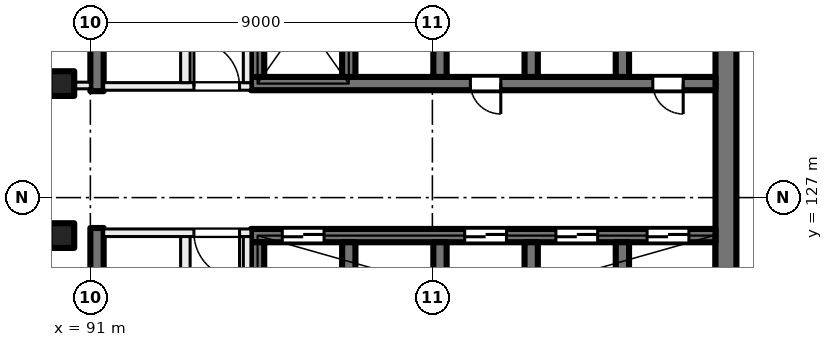
"""IFC4 building model, lengths in metres.
Left out: names, types, materials, properties, quantities, classifications, styles, units other than length and angle.
Written with IfcOpenShell. Run it as: python <this file> out.ifc"""

import sys

from ifc_helpers import new_model, si_unit, direction, frame, frame_2d, origin, origin_2d, place, context, subcontext, project, spatial, rectangle, extrude, element, fill, save


model = new_model("IFC4")
c1 = context("Model", 3, precision=1e-05, world=origin(), true_north=direction((0.0, 1.0)))
c2 = subcontext(c1, "Body", "Model", "MODEL_VIEW")
j1 = project(units=[si_unit("LENGTHUNIT", "METRE"), si_unit("PLANEANGLEUNIT", "RADIAN")], contexts=[c1])
p1 = place(None, origin())
s1 = spatial("IfcSite", under=j1, at=p1, CompositionType="ELEMENT")
p2 = place(p1, origin())
s2 = spatial("IfcBuilding", under=s1, at=p2, CompositionType="ELEMENT")
p3 = place(p2, frame((0.0, 0.0, 142.5)))
s3 = spatial("IfcBuildingStorey", under=s2, at=p3, CompositionType="ELEMENT", Elevation=142.5)
for number, where, z_axis, x_axis in (
    (1, (90.25, 130.0, 0.0), (0.0, 0.0, 1.0), (1.0, 0.0, 0.0)),
    (2, (90.25, 126.0, 0.0), (0.0, 0.0, 1.0), (1.0, 0.0, 0.0)),
):
    element("IfcColumn", number, at=place(p3, frame(where, z_axis=z_axis, x_axis=x_axis)), inside=s3, PredefinedType="COLUMN", context=c2, shape_type="SweptSolid", body=[
        extrude(rectangle(XDim=0.65, YDim=0.65, at=origin_2d()), origin(), (0.0, 0.0, 1.0), 4.0),
    ])
p4 = place(p3, frame((107.725, 135.2, 0.0), z_axis=(0.0, 0.0, 1.0), x_axis=(0.0, -1.0, 0.0)))
e3 = element("IfcWall", 3, at=p4, inside=s3, PredefinedType="SHEAR", context=c2, shape_type="SweptSolid", body=[
    extrude(rectangle(XDim=14.4, YDim=0.55, at=frame_2d((7.2, 0.0))), origin(), (0.0, 0.0, 1.0), 4.0),
])
p5 = place(p3, frame((107.45, 130.0, 0.0), z_axis=(0.0, 0.0, 1.0), x_axis=(-1.0, 0.0, 0.0)))
e4 = element("IfcWall", 4, at=p5, inside=s3, PredefinedType="SHEAR", context=c2, shape_type="SweptSolid", body=[
    extrude(rectangle(XDim=12.225, YDim=0.35, at=frame_2d((6.112, 0.0))), origin(), (0.0, 0.0, 1.0), 4.0),
])
p6 = place(p5, frame((0.85, 0.0, 0.0)))
e5 = element("IfcOpeningElement", 5, at=p6, cuts=e4, PredefinedType="OPENING", context=c2, shape_type="SweptSolid", body=[
    extrude(rectangle(XDim=0.8, YDim=2.1, at=frame_2d((0.4, 1.05))), frame((0.0, 0.185, 0.0), z_axis=(0.0, -1.0, 0.0), x_axis=(1.0, 0.0, 0.0)), (0.0, 0.0, 1.0), 0.37),
])
p7 = place(p5, frame((5.65, 0.0, 0.0)))
e6 = element("IfcOpeningElement", 6, at=p7, cuts=e4, PredefinedType="OPENING", context=c2, shape_type="SweptSolid", body=[
    extrude(rectangle(XDim=0.8, YDim=2.1, at=frame_2d((0.4, 1.05))), frame((0.0, 0.185, 0.0), z_axis=(0.0, -1.0, 0.0), x_axis=(1.0, 0.0, 0.0)), (0.0, 0.0, 1.0), 0.37),
])
for number, where, z_axis, x_axis in (
    (7, (105.0, 133.225, 0.0), (0.0, 0.0, 1.0), (0.0, -1.0, 0.0)),
    (8, (102.6, 133.225, 0.0), (0.0, 0.0, 1.0), (0.0, -1.0, 0.0)),
    (9, (100.2, 133.225, 0.0), (0.0, 0.0, 1.0), (0.0, -1.0, 0.0)),
    (10, (97.8, 133.225, 0.0), (0.0, 0.0, 1.0), (0.0, -1.0, 0.0)),
    (11, (95.4, 133.225, 0.0), (0.0, 0.0, 1.0), (0.0, -1.0, 0.0)),
):
    element("IfcWall", number, at=place(p3, frame(where, z_axis=z_axis, x_axis=x_axis)), inside=s3, PredefinedType="SHEAR", context=c2, shape_type="SweptSolid", body=[
        extrude(rectangle(XDim=3.05, YDim=0.35, at=frame_2d((1.525, 0.0))), origin(), (0.0, 0.0, 1.0), 4.0),
    ])
p8 = place(p3, frame((107.45, 126.0, 0.0), z_axis=(0.0, 0.0, 1.0), x_axis=(-1.0, 0.0, 0.0)))
e12 = element("IfcWall", 12, at=p8, inside=s3, PredefinedType="SHEAR", context=c2, shape_type="SweptSolid", body=[
    extrude(rectangle(XDim=12.225, YDim=0.35, at=frame_2d((6.112, 0.0))), origin(), (0.0, 0.0, 1.0), 4.0),
])
p9 = place(p8, frame((0.7, 0.0, 0.0)))
e13 = element("IfcOpeningElement", 13, at=p9, cuts=e12, PredefinedType="OPENING", context=c2, shape_type="SweptSolid", body=[
    extrude(rectangle(XDim=1.1, YDim=2.1, at=frame_2d((0.55, 1.05))), frame((0.0, 0.185, 0.0), z_axis=(0.0, -1.0, 0.0), x_axis=(1.0, 0.0, 0.0)), (0.0, 0.0, 1.0), 0.37),
])
p10 = place(p8, frame((3.1, 0.0, 0.0)))
e14 = element("IfcOpeningElement", 14, at=p10, cuts=e12, PredefinedType="OPENING", context=c2, shape_type="SweptSolid", body=[
    extrude(rectangle(XDim=1.1, YDim=2.1, at=frame_2d((0.55, 1.05))), frame((0.0, 0.185, 0.0), z_axis=(0.0, -1.0, 0.0), x_axis=(1.0, 0.0, 0.0)), (0.0, 0.0, 1.0), 0.37),
])
p11 = place(p8, frame((5.5, 0.0, 0.0)))
e15 = element("IfcOpeningElement", 15, at=p11, cuts=e12, PredefinedType="OPENING", context=c2, shape_type="SweptSolid", body=[
    extrude(rectangle(XDim=1.1, YDim=2.1, at=frame_2d((0.55, 1.05))), frame((0.0, 0.185, 0.0), z_axis=(0.0, -1.0, 0.0), x_axis=(1.0, 0.0, 0.0)), (0.0, 0.0, 1.0), 0.37),
])
p12 = place(p8, frame((10.3, 0.0, 0.0)))
e16 = element("IfcOpeningElement", 16, at=p12, cuts=e12, PredefinedType="OPENING", context=c2, shape_type="SweptSolid", body=[
    extrude(rectangle(XDim=1.1, YDim=2.1, at=frame_2d((0.55, 1.05))), frame((0.0, 0.185, 0.0), z_axis=(0.0, -1.0, 0.0), x_axis=(1.0, 0.0, 0.0)), (0.0, 0.0, 1.0), 0.37),
])
for number, where, z_axis, x_axis in (
    (17, (105.0, 125.825, 0.0), (0.0, 0.0, 1.0), (0.0, -1.0, 0.0)),
    (18, (102.6, 125.825, 0.0), (0.0, 0.0, 1.0), (0.0, -1.0, 0.0)),
    (19, (100.2, 125.825, 0.0), (0.0, 0.0, 1.0), (0.0, -1.0, 0.0)),
    (20, (97.8, 125.825, 0.0), (0.0, 0.0, 1.0), (0.0, -1.0, 0.0)),
    (21, (95.4, 125.825, 0.0), (0.0, 0.0, 1.0), (0.0, -1.0, 0.0)),
):
    element("IfcWall", number, at=place(p3, frame(where, z_axis=z_axis, x_axis=x_axis)), inside=s3, PredefinedType="SHEAR", context=c2, shape_type="SweptSolid", body=[
        extrude(rectangle(XDim=3.05, YDim=0.35, at=frame_2d((1.525, 0.0))), origin(), (0.0, 0.0, 1.0), 4.0),
    ])
for number, where, z_axis, x_axis in (
    (22, (91.175, 138.45, 0.0), (0.0, 0.0, 1.0), (0.0, -1.0, 0.0)),
    (23, (91.175, 126.2, 0.0), (0.0, 0.0, 1.0), (0.0, -1.0, 0.0)),
):
    element("IfcWall", number, at=place(p3, frame(where, z_axis=z_axis, x_axis=x_axis)), inside=s3, PredefinedType="SHEAR", context=c2, shape_type="SweptSolid", body=[
        extrude(rectangle(XDim=8.65, YDim=0.35, at=frame_2d((4.325, 0.0))), origin(), (0.0, 0.0, 1.0), 4.0),
    ])
p13 = place(p3, frame((95.225, 126.075, 0.0), z_axis=(0.0, 0.0, 1.0), x_axis=(-1.0, 0.0, 0.0)))
e24 = element("IfcWall", 24, at=p13, inside=s3, PredefinedType="PARTITIONING", context=c2, shape_type="SweptSolid", body=[
    extrude(rectangle(XDim=3.875, YDim=0.2, at=frame_2d((1.938, 0.0))), origin(), (0.0, 0.0, 1.0), 3.625),
])
p14 = place(p13, frame((0.3, 0.0, 0.0)))
e25 = element("IfcOpeningElement", 25, at=p14, cuts=e24, PredefinedType="OPENING", context=c2, shape_type="SweptSolid", body=[
    extrude(rectangle(XDim=1.2, YDim=2.1, at=frame_2d((0.6, 1.05))), frame((0.0, 0.11, 0.0), z_axis=(0.0, -1.0, 0.0), x_axis=(1.0, 0.0, 0.0)), (0.0, 0.0, 1.0), 0.22),
])
p15 = place(p3, frame((95.125, 117.55, 0.0), z_axis=(0.0, 0.0, 1.0), x_axis=(0.0, 1.0, 0.0)))
e26 = element("IfcWall", 26, at=p15, inside=s3, PredefinedType="PARTITIONING", context=c2, shape_type="SweptSolid", body=[
    extrude(rectangle(XDim=8.425, YDim=0.2, at=frame_2d((4.212, 0.0))), origin(), (0.0, 0.0, 1.0), 3.625),
])
p16 = place(p15, frame((1.688, 0.0, 0.0)))
e27 = element("IfcOpeningElement", 27, at=p16, cuts=e26, PredefinedType="OPENING", context=c2, shape_type="SweptSolid", body=[
    extrude(rectangle(XDim=1.5, YDim=2.1, at=frame_2d((0.75, 1.05))), frame((0.0, 0.11, 0.0), z_axis=(0.0, -1.0, 0.0), x_axis=(1.0, 0.0, 0.0)), (0.0, 0.0, 1.0), 0.22),
])
p17 = place(p3, frame((93.5, 117.55, 0.0), z_axis=(0.0, 0.0, 1.0), x_axis=(0.0, 1.0, 0.0)))
e28 = element("IfcWall", 28, at=p17, inside=s3, PredefinedType="PARTITIONING", context=c2, shape_type="SweptSolid", body=[
    extrude(rectangle(XDim=8.425, YDim=0.25, at=frame_2d((4.212, 0.0))), origin(), (0.0, 0.0, 1.0), 3.625),
])
p18 = place(p17, frame((5.942, 0.0, 0.0)))
e29 = element("IfcOpeningElement", 29, at=p18, cuts=e28, PredefinedType="OPENING", context=c2, shape_type="SweptSolid", body=[
    extrude(rectangle(XDim=0.8, YDim=2.1, at=frame_2d((0.4, 1.05))), frame((0.0, 0.135, 0.0), z_axis=(0.0, -1.0, 0.0), x_axis=(1.0, 0.0, 0.0)), (0.0, 0.0, 1.0), 0.27),
])
p19 = place(p17, frame((1.68, 0.0, 0.0)))
e30 = element("IfcOpeningElement", 30, at=p19, cuts=e28, PredefinedType="OPENING", context=c2, shape_type="SweptSolid", body=[
    extrude(rectangle(XDim=0.8, YDim=2.1, at=frame_2d((0.4, 1.05))), frame((0.0, 0.135, 0.0), z_axis=(0.0, -1.0, 0.0), x_axis=(1.0, 0.0, 0.0)), (0.0, 0.0, 1.0), 0.27),
])
p20 = place(p3, frame((91.35, 129.925, 0.0), z_axis=(0.0, 0.0, 1.0), x_axis=(1.0, 0.0, 0.0)))
e31 = element("IfcWall", 31, at=p20, inside=s3, PredefinedType="PARTITIONING", context=c2, shape_type="SweptSolid", body=[
    extrude(rectangle(XDim=3.875, YDim=0.2, at=frame_2d((1.938, 0.0))), origin(), (0.0, 0.0, 1.0), 3.625),
])
p21 = place(p20, frame((2.375, 0.0, 0.0)))
e32 = element("IfcOpeningElement", 32, at=p21, cuts=e31, PredefinedType="OPENING", context=c2, shape_type="SweptSolid", body=[
    extrude(rectangle(XDim=1.2, YDim=2.1, at=frame_2d((0.6, 1.05))), frame((0.0, 0.11, 0.0), z_axis=(0.0, -1.0, 0.0), x_axis=(1.0, 0.0, 0.0)), (0.0, 0.0, 1.0), 0.22),
])
p22 = place(p3, frame((95.125, 130.025, 0.0), z_axis=(0.0, 0.0, 1.0), x_axis=(0.0, 1.0, 0.0)))
e33 = element("IfcWall", 33, at=p22, inside=s3, PredefinedType="PARTITIONING", context=c2, shape_type="SweptSolid", body=[
    extrude(rectangle(XDim=8.425, YDim=0.2, at=frame_2d((4.212, 0.0))), origin(), (0.0, 0.0, 1.0), 3.625),
])
p23 = place(p22, frame((5.238, 0.0, 0.0)))
e34 = element("IfcOpeningElement", 34, at=p23, cuts=e33, PredefinedType="OPENING", context=c2, shape_type="SweptSolid", body=[
    extrude(rectangle(XDim=1.5, YDim=2.1, at=frame_2d((0.75, 1.05))), frame((0.0, 0.11, 0.0), z_axis=(0.0, -1.0, 0.0), x_axis=(1.0, 0.0, 0.0)), (0.0, 0.0, 1.0), 0.22),
])
p24 = place(p3, frame((93.5, 130.025, 0.0), z_axis=(0.0, 0.0, 1.0), x_axis=(0.0, 1.0, 0.0)))
e35 = element("IfcWall", 35, at=p24, inside=s3, PredefinedType="PARTITIONING", context=c2, shape_type="SweptSolid", body=[
    extrude(rectangle(XDim=8.425, YDim=0.25, at=frame_2d((4.212, 0.0))), origin(), (0.0, 0.0, 1.0), 3.625),
])
p25 = place(p24, frame((0.978, 0.0, 0.0)))
e36 = element("IfcOpeningElement", 36, at=p25, cuts=e35, PredefinedType="OPENING", context=c2, shape_type="SweptSolid", body=[
    extrude(rectangle(XDim=0.8, YDim=2.1, at=frame_2d((0.4, 1.05))), frame((0.0, 0.135, 0.0), z_axis=(0.0, -1.0, 0.0), x_axis=(1.0, 0.0, 0.0)), (0.0, 0.0, 1.0), 0.27),
])
p26 = place(p24, frame((5.24, 0.0, 0.0)))
e37 = element("IfcOpeningElement", 37, at=p26, cuts=e35, PredefinedType="OPENING", context=c2, shape_type="SweptSolid", body=[
    extrude(rectangle(XDim=0.8, YDim=2.1, at=frame_2d((0.4, 1.05))), frame((0.0, 0.135, 0.0), z_axis=(0.0, -1.0, 0.0), x_axis=(1.0, 0.0, 0.0)), (0.0, 0.0, 1.0), 0.27),
])
p27 = place(p3, frame((85.838, 129.95, 0.0), z_axis=(0.0, 0.0, 1.0), x_axis=(1.0, 0.0, 0.0)))
e38 = element("IfcWall", 38, at=p27, inside=s3, PredefinedType="PARTITIONING", context=c2, shape_type="SweptSolid", body=[
    extrude(rectangle(XDim=5.162, YDim=0.175, at=frame_2d((2.581, 0.0))), origin(), (0.0, 0.0, 1.0), 3.625),
])
p28 = place(p27, frame((1.971, 0.0, 0.0)))
e39 = element("IfcOpeningElement", 39, at=p28, cuts=e38, PredefinedType="OPENING", context=c2, shape_type="SweptSolid", body=[
    extrude(rectangle(XDim=1.2, YDim=2.1, at=frame_2d((0.6, 1.05))), frame((0.0, 0.097, 0.0), z_axis=(0.0, -1.0, 0.0), x_axis=(1.0, 0.0, 0.0)), (0.0, 0.0, 1.0), 0.195),
])
p29 = place(p9, origin())
e40 = element("IfcDoor", 40, at=p29, inside=s3, OperationType="DOUBLE_DOOR_SLIDING", PredefinedType="DOOR", context=c2, shape_type="SweptSolid", body=[
    extrude(rectangle(XDim=1.1, YDim=2.1, at=frame_2d((0.55, 1.05))), frame((0.0, 0.025, 0.0), z_axis=(0.0, -1.0, 0.0), x_axis=(1.0, 0.0, 0.0)), (0.0, 0.0, 1.0), 0.05),
])
fill(e13, e40)
p30 = place(p10, origin())
e41 = element("IfcDoor", 41, at=p30, inside=s3, OperationType="DOUBLE_DOOR_SLIDING", PredefinedType="DOOR", context=c2, shape_type="SweptSolid", body=[
    extrude(rectangle(XDim=1.1, YDim=2.1, at=frame_2d((0.55, 1.05))), frame((0.0, 0.025, 0.0), z_axis=(0.0, -1.0, 0.0), x_axis=(1.0, 0.0, 0.0)), (0.0, 0.0, 1.0), 0.05),
])
fill(e14, e41)
p31 = place(p11, origin())
e42 = element("IfcDoor", 42, at=p31, inside=s3, OperationType="DOUBLE_DOOR_SLIDING", PredefinedType="DOOR", context=c2, shape_type="SweptSolid", body=[
    extrude(rectangle(XDim=1.1, YDim=2.1, at=frame_2d((0.55, 1.05))), frame((0.0, 0.025, 0.0), z_axis=(0.0, -1.0, 0.0), x_axis=(1.0, 0.0, 0.0)), (0.0, 0.0, 1.0), 0.05),
])
fill(e15, e42)
p32 = place(p12, origin())
e43 = element("IfcDoor", 43, at=p32, inside=s3, OperationType="DOUBLE_DOOR_SLIDING", PredefinedType="DOOR", context=c2, shape_type="SweptSolid", body=[
    extrude(rectangle(XDim=1.1, YDim=2.1, at=frame_2d((0.55, 1.05))), frame((0.0, 0.025, 0.0), z_axis=(0.0, -1.0, 0.0), x_axis=(1.0, 0.0, 0.0)), (0.0, 0.0, 1.0), 0.05),
])
fill(e16, e43)
p33 = place(p6, origin())
e44 = element("IfcDoor", 44, at=p33, inside=s3, OperationType="SINGLE_SWING_LEFT", PredefinedType="DOOR", context=c2, shape_type="SweptSolid", body=[
    extrude(rectangle(XDim=0.8, YDim=2.1, at=frame_2d((0.4, 1.05))), frame((0.0, 0.025, 0.0), z_axis=(0.0, -1.0, 0.0), x_axis=(1.0, 0.0, 0.0)), (0.0, 0.0, 1.0), 0.05),
])
fill(e5, e44)
p34 = place(p7, origin())
e45 = element("IfcDoor", 45, at=p34, inside=s3, OperationType="SINGLE_SWING_RIGHT", PredefinedType="DOOR", context=c2, shape_type="SweptSolid", body=[
    extrude(rectangle(XDim=0.8, YDim=2.1, at=frame_2d((0.4, 1.05))), frame((0.0, 0.025, 0.0), z_axis=(0.0, -1.0, 0.0), x_axis=(1.0, 0.0, 0.0)), (0.0, 0.0, 1.0), 0.05),
])
fill(e6, e45)
p35 = place(p14, origin())
e46 = element("IfcDoor", 46, at=p35, inside=s3, OperationType="DOUBLE_DOOR_SINGLE_SWING", PredefinedType="DOOR", context=c2, shape_type="SweptSolid", body=[
    extrude(rectangle(XDim=1.2, YDim=2.1, at=frame_2d((0.6, 1.05))), frame((0.0, 0.025, 0.0), z_axis=(0.0, -1.0, 0.0), x_axis=(1.0, 0.0, 0.0)), (0.0, 0.0, 1.0), 0.05),
])
fill(e25, e46)
p36 = place(p21, origin())
e47 = element("IfcDoor", 47, at=p36, inside=s3, OperationType="DOUBLE_DOOR_SINGLE_SWING", PredefinedType="DOOR", context=c2, shape_type="SweptSolid", body=[
    extrude(rectangle(XDim=1.2, YDim=2.1, at=frame_2d((0.6, 1.05))), frame((0.0, 0.025, 0.0), z_axis=(0.0, -1.0, 0.0), x_axis=(1.0, 0.0, 0.0)), (0.0, 0.0, 1.0), 0.05),
])
fill(e32, e47)
save(model, sys.argv[1])
